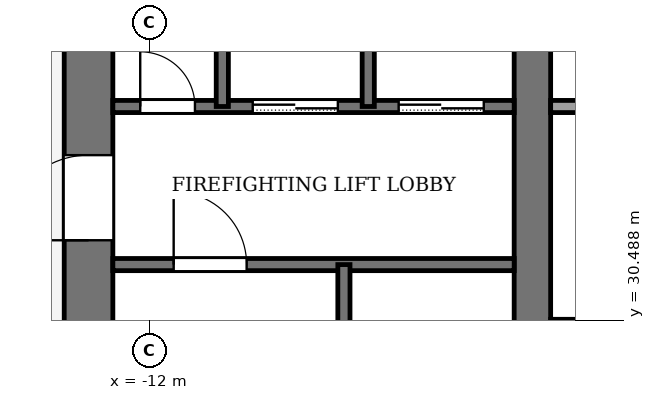
"""IFC4 building model, lengths in metres.
Left out: names, types, materials, properties, quantities, classifications, styles, units other than length and angle.
Written with IfcOpenShell. Run it as: python <this file> out.ifc"""

import sys

from ifc_helpers import new_model, si_unit, direction, frame, frame_2d, origin, place, context, subcontext, project, spatial, rectangle, extrude, element, fill, save


model = new_model("IFC4")
c1 = context("Model", 3, precision=1e-05, world=origin(), true_north=direction((0.0, 1.0)))
c2 = subcontext(c1, "Body", "Model", "MODEL_VIEW")
j1 = project(units=[si_unit("LENGTHUNIT", "METRE"), si_unit("PLANEANGLEUNIT", "RADIAN")], contexts=[c1])
p1 = place(None, origin())
s1 = spatial("IfcSite", under=j1, at=p1, CompositionType="ELEMENT")
p2 = place(p1, origin())
s2 = spatial("IfcBuilding", under=s1, at=p2, CompositionType="ELEMENT")
p3 = place(p2, frame((0.0, 0.0, 238.0)))
s3 = spatial("IfcBuildingStorey", under=s2, at=p3, CompositionType="ELEMENT", Elevation=238.0)
p4 = place(p3, frame((-13.0, 18.4, -0.13), z_axis=(0.0, 0.0, 1.0), x_axis=(0.0, 1.0, 0.0)))
e1 = element("IfcWall", 1, at=p4, inside=s3, PredefinedType="SHEAR", context=c2, shape_type="SweptSolid", body=[
    extrude(rectangle(XDim=19.2, YDim=0.8, at=frame_2d((9.6, 0.0))), origin(), (0.0, 0.0, 1.0), 4.0),
])
p5 = place(p4, frame((2.8, 0.0, 0.13)))
e2 = element("IfcOpeningElement", 2, at=p5, cuts=e1, PredefinedType="OPENING", context=c2, shape_type="SweptSolid", body=[
    extrude(rectangle(XDim=2.4, YDim=2.4, at=frame_2d((1.2, 1.2))), frame((0.0, 0.41, 0.0), z_axis=(0.0, -1.0, 0.0), x_axis=(1.0, 0.0, 0.0)), (0.0, 0.0, 1.0), 0.82),
])
p6 = place(p4, frame((13.4, 0.0, 0.13)))
e3 = element("IfcOpeningElement", 3, at=p6, cuts=e1, PredefinedType="OPENING", context=c2, shape_type="SweptSolid", body=[
    extrude(rectangle(XDim=1.4, YDim=2.2, at=frame_2d((0.7, 1.1))), frame((0.0, 0.41, 0.0), z_axis=(0.0, -1.0, 0.0), x_axis=(1.0, 0.0, 0.0)), (0.0, 0.0, 1.0), 0.82),
])
p7 = place(p3, frame((-5.7, 18.4, -0.13), z_axis=(0.0, 0.0, 1.0), x_axis=(0.0, 1.0, 0.0)))
e4 = element("IfcWall", 4, at=p7, inside=s3, PredefinedType="SHEAR", context=c2, shape_type="SweptSolid", body=[
    extrude(rectangle(XDim=19.2, YDim=0.6, at=frame_2d((9.6, 0.0))), origin(), (0.0, 0.0, 1.0), 4.0),
])
p8 = place(p7, frame((8.35, 0.0, 0.13)))
e5 = element("IfcOpeningElement", 5, at=p8, cuts=e4, PredefinedType="OPENING", context=c2, shape_type="SweptSolid", body=[
    extrude(rectangle(XDim=0.9, YDim=2.1, at=frame_2d((0.45, 1.05))), frame((0.0, 0.31, 0.0), z_axis=(0.0, -1.0, 0.0), x_axis=(1.0, 0.0, 0.0)), (0.0, 0.0, 1.0), 0.62),
])
p9 = place(p3, frame((-12.6, 31.4, 0.0), z_axis=(0.0, 0.0, 1.0), x_axis=(1.0, 0.0, 0.0)))
e6 = element("IfcWall", 6, at=p9, inside=s3, PredefinedType="PARTITIONING", context=c2, shape_type="SweptSolid", body=[
    extrude(rectangle(XDim=6.6, YDim=0.2, at=frame_2d((3.3, 0.0))), origin(), (0.0, 0.0, 1.0), 3.87),
])
p10 = place(p9, frame((1.0, 0.0, 0.0)))
e7 = element("IfcOpeningElement", 7, at=p10, cuts=e6, PredefinedType="OPENING", context=c2, shape_type="SweptSolid", body=[
    extrude(rectangle(XDim=1.2, YDim=2.2, at=frame_2d((0.6, 1.1))), frame((0.0, 0.11, 0.0), z_axis=(0.0, -1.0, 0.0), x_axis=(1.0, 0.0, 0.0)), (0.0, 0.0, 1.0), 0.22),
])
p11 = place(p3, frame((-12.6, 34.0, 0.0), z_axis=(0.0, 0.0, 1.0), x_axis=(1.0, 0.0, 0.0)))
e8 = element("IfcWall", 8, at=p11, inside=s3, PredefinedType="PARTITIONING", context=c2, shape_type="SweptSolid", body=[
    extrude(rectangle(XDim=6.6, YDim=0.2, at=frame_2d((3.3, 0.0))), origin(), (0.0, 0.0, 1.0), 3.87),
])
p12 = place(p11, frame((4.7, 0.0, 0.0)))
e9 = element("IfcOpeningElement", 9, at=p12, cuts=e8, PredefinedType="OPENING", context=c2, shape_type="SweptSolid", body=[
    extrude(rectangle(XDim=1.4, YDim=2.2, at=frame_2d((0.7, 1.1))), frame((0.0, 0.11, 0.0), z_axis=(0.0, -1.0, 0.0), x_axis=(1.0, 0.0, 0.0)), (0.0, 0.0, 1.0), 0.22),
])
p13 = place(p11, frame((2.3, 0.0, 0.0)))
e10 = element("IfcOpeningElement", 10, at=p13, cuts=e8, PredefinedType="OPENING", context=c2, shape_type="SweptSolid", body=[
    extrude(rectangle(XDim=1.4, YDim=2.2, at=frame_2d((0.7, 1.1))), frame((0.0, 0.11, 0.0), z_axis=(0.0, -1.0, 0.0), x_axis=(1.0, 0.0, 0.0)), (0.0, 0.0, 1.0), 0.22),
])
p14 = place(p11, frame((0.45, 0.0, 0.0)))
e11 = element("IfcOpeningElement", 11, at=p14, cuts=e8, PredefinedType="OPENING", context=c2, shape_type="SweptSolid", body=[
    extrude(rectangle(XDim=0.9, YDim=2.1, at=frame_2d((0.45, 1.05))), frame((0.0, 0.11, 0.0), z_axis=(0.0, -1.0, 0.0), x_axis=(1.0, 0.0, 0.0)), (0.0, 0.0, 1.0), 0.22),
])
p15 = place(p3, frame((-5.4, 34.0, 0.0), z_axis=(0.0, 0.0, 1.0), x_axis=(1.0, 0.0, 0.0)))
e12 = element("IfcWall", 12, at=p15, inside=s3, PredefinedType="PARTITIONING", context=c2, shape_type="SweptSolid", body=[
    extrude(rectangle(XDim=10.8, YDim=0.2, at=frame_2d((5.4, 0.0))), origin(), (0.0, 0.0, 1.0), 3.87),
])
p16 = place(p15, frame((6.15, 0.0, 0.0)))
e13 = element("IfcOpeningElement", 13, at=p16, cuts=e12, PredefinedType="OPENING", context=c2, shape_type="SweptSolid", body=[
    extrude(rectangle(XDim=1.2, YDim=2.2, at=frame_2d((0.6, 1.1))), frame((0.0, 0.11, 0.0), z_axis=(0.0, -1.0, 0.0), x_axis=(1.0, 0.0, 0.0)), (0.0, 0.0, 1.0), 0.22),
])
p17 = place(p15, frame((8.95, 0.0, 0.0)))
e14 = element("IfcOpeningElement", 14, at=p17, cuts=e12, PredefinedType="OPENING", context=c2, shape_type="SweptSolid", body=[
    extrude(rectangle(XDim=1.0, YDim=2.1, at=frame_2d((0.5, 1.05))), frame((0.0, 0.11, 0.0), z_axis=(0.0, -1.0, 0.0), x_axis=(1.0, 0.0, 0.0)), (0.0, 0.0, 1.0), 0.22),
])
p18 = place(p3, frame((-10.8, 34.0, 0.0), z_axis=(0.0, 0.0, 1.0), x_axis=(0.0, 1.0, 0.0)))
e15 = element("IfcWall", 15, at=p18, inside=s3, PredefinedType="PARTITIONING", context=c2, shape_type="SweptSolid", body=[
    extrude(rectangle(XDim=3.6, YDim=0.2, at=frame_2d((1.8, 0.0))), origin(), (0.0, 0.0, 1.0), 3.87),
])
p19 = place(p3, frame((-8.8, 24.0, 0.0), z_axis=(0.0, 0.0, 1.0), x_axis=(0.0, 1.0, 0.0)))
e16 = element("IfcWall", 16, at=p19, inside=s3, PredefinedType="PARTITIONING", context=c2, shape_type="SweptSolid", body=[
    extrude(rectangle(XDim=7.4, YDim=0.2, at=frame_2d((3.7, 0.0))), origin(), (0.0, 0.0, 1.0), 3.87),
])
p20 = place(p3, frame((-8.4, 34.0, 0.0), z_axis=(0.0, 0.0, 1.0), x_axis=(0.0, 1.0, 0.0)))
e17 = element("IfcWall", 17, at=p20, inside=s3, PredefinedType="PARTITIONING", context=c2, shape_type="SweptSolid", body=[
    extrude(rectangle(XDim=3.6, YDim=0.2, at=frame_2d((1.8, 0.0))), origin(), (0.0, 0.0, 1.0), 3.87),
])
p21 = place(p12, origin())
e18 = element("IfcDoor", 18, at=p21, inside=s3, OperationType="SLIDING_TO_LEFT", PredefinedType="DOOR", context=c2, shape_type="SweptSolid", body=[
    extrude(rectangle(XDim=1.4, YDim=2.2, at=frame_2d((0.7, 1.1))), frame((0.0, 0.025, 0.0), z_axis=(0.0, -1.0, 0.0), x_axis=(1.0, 0.0, 0.0)), (0.0, 0.0, 1.0), 0.05),
])
fill(e9, e18)
p22 = place(p13, origin())
e19 = element("IfcDoor", 19, at=p22, inside=s3, OperationType="SLIDING_TO_LEFT", PredefinedType="DOOR", context=c2, shape_type="SweptSolid", body=[
    extrude(rectangle(XDim=1.4, YDim=2.2, at=frame_2d((0.7, 1.1))), frame((0.0, 0.025, 0.0), z_axis=(0.0, -1.0, 0.0), x_axis=(1.0, 0.0, 0.0)), (0.0, 0.0, 1.0), 0.05),
])
fill(e10, e19)
p23 = place(p14, origin())
e20 = element("IfcDoor", 20, at=p23, inside=s3, OperationType="SINGLE_SWING_RIGHT", PredefinedType="DOOR", context=c2, shape_type="SweptSolid", body=[
    extrude(rectangle(XDim=0.9, YDim=2.1, at=frame_2d((0.45, 1.05))), frame((0.0, 0.025, 0.0), z_axis=(0.0, -1.0, 0.0), x_axis=(1.0, 0.0, 0.0)), (0.0, 0.0, 1.0), 0.05),
])
fill(e11, e20)
p24 = place(p10, origin())
e21 = element("IfcDoor", 21, at=p24, inside=s3, OperationType="SINGLE_SWING_RIGHT", PredefinedType="DOOR", context=c2, shape_type="SweptSolid", body=[
    extrude(rectangle(XDim=1.2, YDim=2.2, at=frame_2d((0.6, 1.1))), frame((0.0, 0.025, 0.0), z_axis=(0.0, -1.0, 0.0), x_axis=(1.0, 0.0, 0.0)), (0.0, 0.0, 1.0), 0.05),
])
fill(e7, e21)
p25 = place(p6, origin())
e22 = element("IfcDoor", 22, at=p25, inside=s3, OperationType="SINGLE_SWING_RIGHT", PredefinedType="DOOR", context=c2, shape_type="SweptSolid", body=[
    extrude(rectangle(XDim=1.4, YDim=2.2, at=frame_2d((0.7, 1.1))), frame((0.0, 0.025, 0.0), z_axis=(0.0, -1.0, 0.0), x_axis=(1.0, 0.0, 0.0)), (0.0, 0.0, 1.0), 0.05),
])
fill(e3, e22)
save(model, sys.argv[1])
